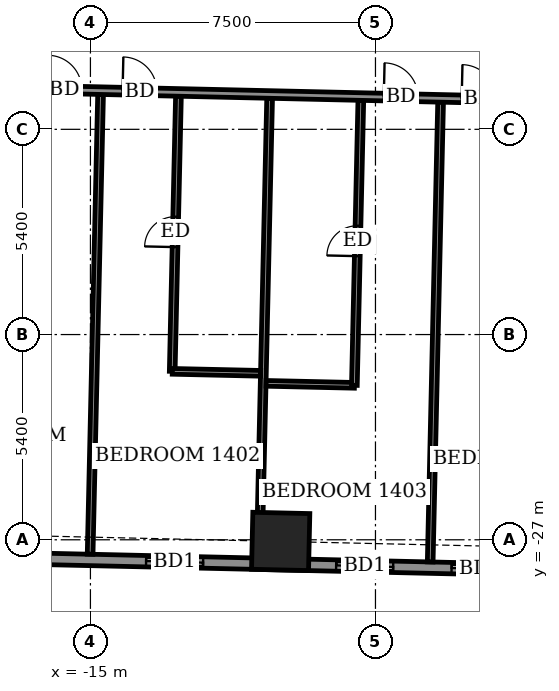
"""IFC4 building model, lengths in metres.
Left out: names, types, materials, properties, quantities, classifications, styles, units other than length and angle.
Written with IfcOpenShell. Run it as: python <this file> out.ifc"""

import sys

from ifc_helpers import new_model, si_unit, direction, frame, frame_2d, origin, origin_2d, place, context, subcontext, project, spatial, rectangle, extrude, element, fill, save


model = new_model("IFC4")
c1 = context("Model", 3, precision=1e-05, world=origin(), true_north=direction((0.0, 1.0)))
c2 = subcontext(c1, "Body", "Model", "MODEL_VIEW")
j1 = project(units=[si_unit("LENGTHUNIT", "METRE"), si_unit("PLANEANGLEUNIT", "RADIAN")], contexts=[c1])
p1 = place(None, origin())
s1 = spatial("IfcSite", under=j1, at=p1, CompositionType="ELEMENT")
p2 = place(p1, origin())
s2 = spatial("IfcBuilding", under=s1, at=p2, CompositionType="ELEMENT")
p3 = place(p2, frame((0.0, 0.0, 60.3)))
s3 = spatial("IfcBuildingStorey", under=s2, at=p3, CompositionType="ELEMENT", Elevation=60.3)
p4 = place(p3, frame((-9.994, -27.043, -0.55), z_axis=(0.0, 0.0, 1.0), x_axis=(0.999742783124, -0.022679673549, 0.0)))
e1 = element("IfcColumn", 1, at=p4, inside=s3, PredefinedType="COLUMN", context=c2, shape_type="SweptSolid", body=[
    extrude(rectangle(XDim=1.5, YDim=1.5, at=origin_2d()), origin(), (0.0, 0.0, 1.0), 3.6),
])
p5 = place(p3, frame((-24.007, -27.326, 0.0), z_axis=(0.0, 0.0, 1.0), x_axis=(0.999742536491, -0.022690542744, 0.0)))
e2 = element("IfcWall", 2, at=p5, inside=s3, PredefinedType="SOLIDWALL", context=c2, shape_type="SweptSolid", body=[
    extrude(rectangle(XDim=49.236, YDim=0.3, at=frame_2d((24.618, 0.0))), origin(), (0.0, 0.0, 1.0), 3.05),
])
p6 = place(p5, frame((2.115, 0.0, 0.0)))
e3 = element("IfcOpeningElement", 3, at=p6, cuts=e2, PredefinedType="OPENING", context=c2, shape_type="SweptSolid", body=[
    extrude(rectangle(XDim=1.5, YDim=2.4, at=frame_2d((0.75, 1.2))), frame((0.0, 0.16, 0.0), z_axis=(0.0, -1.0, 0.0), x_axis=(1.0, 0.0, 0.0)), (0.0, 0.0, 1.0), 0.32),
])
p7 = place(p5, frame((5.088, 0.0, 0.9)))
e4 = element("IfcOpeningElement", 4, at=p7, cuts=e2, PredefinedType="OPENING", context=c2, shape_type="SweptSolid", body=[
    extrude(rectangle(XDim=0.9, YDim=1.5, at=frame_2d((0.45, 0.75))), frame((0.0, 0.16, 0.0), z_axis=(0.0, -1.0, 0.0), x_axis=(1.0, 0.0, 0.0)), (0.0, 0.0, 1.0), 0.32),
])
p8 = place(p5, frame((10.475, 0.0, 0.0)))
e5 = element("IfcOpeningElement", 5, at=p8, cuts=e2, PredefinedType="OPENING", context=c2, shape_type="SweptSolid", body=[
    extrude(rectangle(XDim=1.5, YDim=2.4, at=frame_2d((0.75, 1.2))), frame((0.0, 0.16, 0.0), z_axis=(0.0, -1.0, 0.0), x_axis=(1.0, 0.0, 0.0)), (0.0, 0.0, 1.0), 0.32),
])
p9 = place(p5, frame((15.477, 0.0, 0.0)))
e6 = element("IfcOpeningElement", 6, at=p9, cuts=e2, PredefinedType="OPENING", context=c2, shape_type="SweptSolid", body=[
    extrude(rectangle(XDim=1.5, YDim=2.4, at=frame_2d((0.75, 1.2))), frame((0.0, 0.16, 0.0), z_axis=(0.0, -1.0, 0.0), x_axis=(1.0, 0.0, 0.0)), (0.0, 0.0, 1.0), 0.32),
])
p10 = place(p5, frame((18.515, 0.0, 0.0)))
e7 = element("IfcOpeningElement", 7, at=p10, cuts=e2, PredefinedType="OPENING", context=c2, shape_type="SweptSolid", body=[
    extrude(rectangle(XDim=1.5, YDim=2.4, at=frame_2d((0.75, 1.2))), frame((0.0, 0.16, 0.0), z_axis=(0.0, -1.0, 0.0), x_axis=(1.0, 0.0, 0.0)), (0.0, 0.0, 1.0), 0.32),
])
p11 = place(p5, frame((23.825, 0.0, 0.0)))
e8 = element("IfcOpeningElement", 8, at=p11, cuts=e2, PredefinedType="OPENING", context=c2, shape_type="SweptSolid", body=[
    extrude(rectangle(XDim=1.5, YDim=2.4, at=frame_2d((0.75, 1.2))), frame((0.0, 0.16, 0.0), z_axis=(0.0, -1.0, 0.0), x_axis=(1.0, 0.0, 0.0)), (0.0, 0.0, 1.0), 0.32),
])
p12 = place(p5, frame((29.128, 0.0, 0.0)))
e9 = element("IfcOpeningElement", 9, at=p12, cuts=e2, PredefinedType="OPENING", context=c2, shape_type="SweptSolid", body=[
    extrude(rectangle(XDim=1.5, YDim=2.4, at=frame_2d((0.75, 1.2))), frame((0.0, 0.16, 0.0), z_axis=(0.0, -1.0, 0.0), x_axis=(1.0, 0.0, 0.0)), (0.0, 0.0, 1.0), 0.32),
])
p13 = place(p5, frame((32.166, 0.0, 0.0)))
e10 = element("IfcOpeningElement", 10, at=p13, cuts=e2, PredefinedType="OPENING", context=c2, shape_type="SweptSolid", body=[
    extrude(rectangle(XDim=1.5, YDim=2.4, at=frame_2d((0.75, 1.2))), frame((0.0, 0.16, 0.0), z_axis=(0.0, -1.0, 0.0), x_axis=(1.0, 0.0, 0.0)), (0.0, 0.0, 1.0), 0.32),
])
p14 = place(p5, frame((37.091, 0.0, 0.0)))
e11 = element("IfcOpeningElement", 11, at=p14, cuts=e2, PredefinedType="OPENING", context=c2, shape_type="SweptSolid", body=[
    extrude(rectangle(XDim=1.5, YDim=2.4, at=frame_2d((0.75, 1.2))), frame((0.0, 0.16, 0.0), z_axis=(0.0, -1.0, 0.0), x_axis=(1.0, 0.0, 0.0)), (0.0, 0.0, 1.0), 0.32),
])
p15 = place(p5, frame((40.205, 0.0, 0.0)))
e12 = element("IfcOpeningElement", 12, at=p15, cuts=e2, PredefinedType="OPENING", context=c2, shape_type="SweptSolid", body=[
    extrude(rectangle(XDim=1.2, YDim=2.4, at=frame_2d((0.6, 1.2))), frame((0.0, 0.16, 0.0), z_axis=(0.0, -1.0, 0.0), x_axis=(1.0, 0.0, 0.0)), (0.0, 0.0, 1.0), 0.32),
])
p16 = place(p5, frame((45.047, 0.0, 0.9)))
e13 = element("IfcOpeningElement", 13, at=p16, cuts=e2, PredefinedType="OPENING", context=c2, shape_type="SweptSolid", body=[
    extrude(rectangle(XDim=2.4, YDim=1.5, at=frame_2d((1.2, 0.75))), frame((0.0, 0.16, 0.0), z_axis=(0.0, -1.0, 0.0), x_axis=(1.0, 0.0, 0.0)), (0.0, 0.0, 1.0), 0.32),
])
p17 = place(p3, frame((-15.008, -27.38, 0.0), z_axis=(0.0, 0.0, 1.0), x_axis=(0.02273928012, 0.99974142914, 0.0)))
e14 = element("IfcWall", 14, at=p17, inside=s3, PredefinedType="PARTITIONING", context=c2, shape_type="SweptSolid", body=[
    extrude(rectangle(XDim=12.1, YDim=0.15, at=frame_2d((6.05, 0.0))), origin(), (0.0, 0.0, 1.0), 2.55),
])
p18 = place(p3, frame((-10.559, -27.481, 0.0), z_axis=(0.0, 0.0, 1.0), x_axis=(0.022658614335, 0.999743260641, 0.0)))
e15 = element("IfcWall", 15, at=p18, inside=s3, PredefinedType="PARTITIONING", context=c2, shape_type="SweptSolid", body=[
    extrude(rectangle(XDim=12.1, YDim=0.15, at=frame_2d((6.05, 0.0))), origin(), (0.0, 0.0, 1.0), 3.05),
])
p19 = place(p3, frame((-6.06, -27.583, 0.0), z_axis=(0.0, 0.0, 1.0), x_axis=(0.022658614335, 0.999743260641, 0.0)))
e16 = element("IfcWall", 16, at=p19, inside=s3, PredefinedType="PARTITIONING", context=c2, shape_type="SweptSolid", body=[
    extrude(rectangle(XDim=12.1, YDim=0.15, at=frame_2d((6.05, 0.0))), origin(), (0.0, 0.0, 1.0), 2.55),
])
p20 = place(p3, frame((-10.378, -22.884, 0.0), z_axis=(0.0, 0.0, 1.0), x_axis=(0.999749954681, -0.022361308448, 0.0)))
e17 = element("IfcWall", 17, at=p20, inside=s3, PredefinedType="PARTITIONING", context=c2, shape_type="SweptSolid", body=[
    extrude(rectangle(XDim=2.325, YDim=0.15, at=frame_2d((1.163, 0.0))), origin(), (0.0, 0.0, 1.0), 3.05),
])
p21 = place(p3, frame((-8.055, -22.936, 0.0), z_axis=(0.0, 0.0, 1.0), x_axis=(0.022656334507, 0.999743312309, 0.0)))
e18 = element("IfcWall", 18, at=p21, inside=s3, PredefinedType="PARTITIONING", context=c2, shape_type="SweptSolid", body=[
    extrude(rectangle(XDim=7.5, YDim=0.15, at=frame_2d((3.75, 0.0))), origin(), (0.0, 0.0, 1.0), 3.05),
])
p22 = place(p21, frame((3.4, 0.0, 0.0)))
e19 = element("IfcOpeningElement", 19, at=p22, cuts=e18, PredefinedType="OPENING", context=c2, shape_type="SweptSolid", body=[
    extrude(rectangle(XDim=0.8, YDim=2.1, at=frame_2d((0.4, 1.05))), frame((0.0, 0.085, 0.0), z_axis=(0.0, -1.0, 0.0), x_axis=(1.0, 0.0, 0.0)), (0.0, 0.0, 1.0), 0.17),
])
p23 = place(p3, frame((-12.848, -22.568, 0.0), z_axis=(0.0, 0.0, 1.0), x_axis=(0.022624135841, 0.999744041481, 0.0)))
e20 = element("IfcWall", 20, at=p23, inside=s3, PredefinedType="PARTITIONING", context=c2, shape_type="SweptSolid", body=[
    extrude(rectangle(XDim=7.241, YDim=0.15, at=frame_2d((3.621, 0.0))), origin(), (0.0, 0.0, 1.0), 3.05),
])
p24 = place(p23, frame((3.27, 0.0, 0.0)))
e21 = element("IfcOpeningElement", 21, at=p24, cuts=e20, PredefinedType="OPENING", context=c2, shape_type="SweptSolid", body=[
    extrude(rectangle(XDim=0.8, YDim=2.1, at=frame_2d((0.4, 1.05))), frame((0.0, 0.085, 0.0), z_axis=(0.0, -1.0, 0.0), x_axis=(1.0, 0.0, 0.0)), (0.0, 0.0, 1.0), 0.17),
])
p25 = place(p3, frame((-12.846, -22.568, 0.0), z_axis=(0.0, 0.0, 1.0), x_axis=(0.999749744571, -0.022370700241, 0.0)))
e22 = element("IfcWall", 22, at=p25, inside=s3, PredefinedType="PARTITIONING", context=c2, shape_type="SweptSolid", body=[
    extrude(rectangle(XDim=2.324, YDim=0.15, at=frame_2d((1.162, 0.0))), origin(), (0.0, 0.0, 1.0), 3.05),
])
p26 = place(p3, frame((-26.126, -14.924, 0.0), z_axis=(0.0, 0.0, 1.0), x_axis=(0.999742687583, -0.0226838847, 0.0)))
e23 = element("IfcWall", 23, at=p26, inside=s3, PredefinedType="PARTITIONING", context=c2, shape_type="SweptSolid", body=[
    extrude(rectangle(XDim=54.836, YDim=0.2, at=frame_2d((27.418, 0.0))), origin(), (0.0, 0.0, 1.0), 3.05),
])
p27 = place(p26, frame((0.775, 0.0, 0.0)))
e24 = element("IfcOpeningElement", 24, at=p27, cuts=e23, PredefinedType="OPENING", context=c2, shape_type="SweptSolid", body=[
    extrude(rectangle(XDim=1.0, YDim=2.1, at=frame_2d((0.5, 1.05))), frame((0.0, 0.11, 0.0), z_axis=(0.0, -1.0, 0.0), x_axis=(1.0, 0.0, 0.0)), (0.0, 0.0, 1.0), 0.22),
])
p28 = place(p26, frame((5.45, 0.0, 0.0)))
e25 = element("IfcOpeningElement", 25, at=p28, cuts=e23, PredefinedType="OPENING", context=c2, shape_type="SweptSolid", body=[
    extrude(rectangle(XDim=0.9, YDim=2.1, at=frame_2d((0.45, 1.05))), frame((0.0, 0.11, 0.0), z_axis=(0.0, -1.0, 0.0), x_axis=(1.0, 0.0, 0.0)), (0.0, 0.0, 1.0), 0.22),
])
p29 = place(p26, frame((10.0, 0.0, 0.0)))
e26 = element("IfcOpeningElement", 26, at=p29, cuts=e23, PredefinedType="OPENING", context=c2, shape_type="SweptSolid", body=[
    extrude(rectangle(XDim=0.9, YDim=2.1, at=frame_2d((0.45, 1.05))), frame((0.0, 0.11, 0.0), z_axis=(0.0, -1.0, 0.0), x_axis=(1.0, 0.0, 0.0)), (0.0, 0.0, 1.0), 0.22),
])
p30 = place(p26, frame((11.975, 0.0, 0.0)))
e27 = element("IfcOpeningElement", 27, at=p30, cuts=e23, PredefinedType="OPENING", context=c2, shape_type="SweptSolid", body=[
    extrude(rectangle(XDim=0.9, YDim=2.1, at=frame_2d((0.45, 1.05))), frame((0.0, 0.11, 0.0), z_axis=(0.0, -1.0, 0.0), x_axis=(1.0, 0.0, 0.0)), (0.0, 0.0, 1.0), 0.22),
])
p31 = place(p26, frame((18.85, 0.0, 0.0)))
e28 = element("IfcOpeningElement", 28, at=p31, cuts=e23, PredefinedType="OPENING", context=c2, shape_type="SweptSolid", body=[
    extrude(rectangle(XDim=0.9, YDim=2.1, at=frame_2d((0.45, 1.05))), frame((0.0, 0.11, 0.0), z_axis=(0.0, -1.0, 0.0), x_axis=(1.0, 0.0, 0.0)), (0.0, 0.0, 1.0), 0.22),
])
p32 = place(p26, frame((20.9, 0.0, 0.0)))
e29 = element("IfcOpeningElement", 29, at=p32, cuts=e23, PredefinedType="OPENING", context=c2, shape_type="SweptSolid", body=[
    extrude(rectangle(XDim=0.9, YDim=2.1, at=frame_2d((0.45, 1.05))), frame((0.0, 0.11, 0.0), z_axis=(0.0, -1.0, 0.0), x_axis=(1.0, 0.0, 0.0)), (0.0, 0.0, 1.0), 0.22),
])
p33 = place(p26, frame((27.725, 0.0, 0.0)))
e30 = element("IfcOpeningElement", 30, at=p33, cuts=e23, PredefinedType="OPENING", context=c2, shape_type="SweptSolid", body=[
    extrude(rectangle(XDim=0.9, YDim=2.1, at=frame_2d((0.45, 1.05))), frame((0.0, 0.11, 0.0), z_axis=(0.0, -1.0, 0.0), x_axis=(1.0, 0.0, 0.0)), (0.0, 0.0, 1.0), 0.22),
])
p34 = place(p26, frame((29.7, 0.0, 0.0)))
e31 = element("IfcOpeningElement", 31, at=p34, cuts=e23, PredefinedType="OPENING", context=c2, shape_type="SweptSolid", body=[
    extrude(rectangle(XDim=0.9, YDim=2.1, at=frame_2d((0.45, 1.05))), frame((0.0, 0.11, 0.0), z_axis=(0.0, -1.0, 0.0), x_axis=(1.0, 0.0, 0.0)), (0.0, 0.0, 1.0), 0.22),
])
p35 = place(p26, frame((36.5, 0.0, 0.0)))
e32 = element("IfcOpeningElement", 32, at=p35, cuts=e23, PredefinedType="OPENING", context=c2, shape_type="SweptSolid", body=[
    extrude(rectangle(XDim=0.9, YDim=2.1, at=frame_2d((0.45, 1.05))), frame((0.0, 0.11, 0.0), z_axis=(0.0, -1.0, 0.0), x_axis=(1.0, 0.0, 0.0)), (0.0, 0.0, 1.0), 0.22),
])
p36 = place(p26, frame((38.525, 0.0, 0.0)))
e33 = element("IfcOpeningElement", 33, at=p36, cuts=e23, PredefinedType="OPENING", context=c2, shape_type="SweptSolid", body=[
    extrude(rectangle(XDim=0.9, YDim=2.1, at=frame_2d((0.45, 1.05))), frame((0.0, 0.11, 0.0), z_axis=(0.0, -1.0, 0.0), x_axis=(1.0, 0.0, 0.0)), (0.0, 0.0, 1.0), 0.22),
])
p37 = place(p26, frame((45.325, 0.0, 0.0)))
e34 = element("IfcOpeningElement", 34, at=p37, cuts=e23, PredefinedType="OPENING", context=c2, shape_type="SweptSolid", body=[
    extrude(rectangle(XDim=0.9, YDim=2.1, at=frame_2d((0.45, 1.05))), frame((0.0, 0.11, 0.0), z_axis=(0.0, -1.0, 0.0), x_axis=(1.0, 0.0, 0.0)), (0.0, 0.0, 1.0), 0.22),
])
p38 = place(p26, frame((52.593, 0.0, 0.0)))
e35 = element("IfcOpeningElement", 35, at=p38, cuts=e23, PredefinedType="OPENING", context=c2, shape_type="SweptSolid", body=[
    extrude(rectangle(XDim=1.0, YDim=2.1, at=frame_2d((0.5, 1.05))), frame((0.0, 0.11, 0.0), z_axis=(0.0, -1.0, 0.0), x_axis=(1.0, 0.0, 0.0)), (0.0, 0.0, 1.0), 0.22),
])
p39 = place(p26, frame((47.55, 0.0, 0.0)))
e36 = element("IfcOpeningElement", 36, at=p39, cuts=e23, PredefinedType="OPENING", context=c2, shape_type="SweptSolid", body=[
    extrude(rectangle(XDim=0.9, YDim=2.1, at=frame_2d((0.45, 1.05))), frame((0.0, 0.11, 0.0), z_axis=(0.0, -1.0, 0.0), x_axis=(1.0, 0.0, 0.0)), (0.0, 0.0, 1.0), 0.22),
])
p40 = place(p8, origin())
e37 = element("IfcDoor", 37, at=p40, inside=s3, OperationType="SLIDING_TO_LEFT", PredefinedType="DOOR", context=c2, shape_type="SweptSolid", body=[
    extrude(rectangle(XDim=1.5, YDim=2.4, at=frame_2d((0.75, 1.2))), frame((0.0, 0.025, 0.0), z_axis=(0.0, -1.0, 0.0), x_axis=(1.0, 0.0, 0.0)), (0.0, 0.0, 1.0), 0.05),
])
fill(e5, e37)
p41 = place(p9, origin())
e38 = element("IfcDoor", 38, at=p41, inside=s3, OperationType="SLIDING_TO_LEFT", PredefinedType="DOOR", context=c2, shape_type="SweptSolid", body=[
    extrude(rectangle(XDim=1.5, YDim=2.4, at=frame_2d((0.75, 1.2))), frame((0.0, 0.025, 0.0), z_axis=(0.0, -1.0, 0.0), x_axis=(1.0, 0.0, 0.0)), (0.0, 0.0, 1.0), 0.05),
])
fill(e6, e38)
p42 = place(p10, origin())
e39 = element("IfcDoor", 39, at=p42, inside=s3, OperationType="SLIDING_TO_LEFT", PredefinedType="DOOR", context=c2, shape_type="SweptSolid", body=[
    extrude(rectangle(XDim=1.5, YDim=2.4, at=frame_2d((0.75, 1.2))), frame((0.0, 0.025, 0.0), z_axis=(0.0, -1.0, 0.0), x_axis=(1.0, 0.0, 0.0)), (0.0, 0.0, 1.0), 0.05),
])
fill(e7, e39)
p43 = place(p29, origin())
e40 = element("IfcDoor", 40, at=p43, inside=s3, OperationType="SINGLE_SWING_LEFT", PredefinedType="DOOR", context=c2, shape_type="SweptSolid", body=[
    extrude(rectangle(XDim=0.9, YDim=2.1, at=frame_2d((0.45, 1.05))), frame((0.0, 0.025, 0.0), z_axis=(0.0, -1.0, 0.0), x_axis=(1.0, 0.0, 0.0)), (0.0, 0.0, 1.0), 0.05),
])
fill(e26, e40)
p44 = place(p30, origin())
e41 = element("IfcDoor", 41, at=p44, inside=s3, OperationType="SINGLE_SWING_RIGHT", PredefinedType="DOOR", context=c2, shape_type="SweptSolid", body=[
    extrude(rectangle(XDim=0.9, YDim=2.1, at=frame_2d((0.45, 1.05))), frame((0.0, 0.025, 0.0), z_axis=(0.0, -1.0, 0.0), x_axis=(1.0, 0.0, 0.0)), (0.0, 0.0, 1.0), 0.05),
])
fill(e27, e41)
p45 = place(p24, origin())
e42 = element("IfcDoor", 42, at=p45, inside=s3, OperationType="SINGLE_SWING_RIGHT", PredefinedType="DOOR", context=c2, shape_type="SweptSolid", body=[
    extrude(rectangle(XDim=0.8, YDim=2.1, at=frame_2d((0.4, 1.05))), frame((0.0, 0.025, 0.0), z_axis=(0.0, -1.0, 0.0), x_axis=(1.0, 0.0, 0.0)), (0.0, 0.0, 1.0), 0.05),
])
fill(e21, e42)
p46 = place(p31, origin())
e43 = element("IfcDoor", 43, at=p46, inside=s3, OperationType="SINGLE_SWING_LEFT", PredefinedType="DOOR", context=c2, shape_type="SweptSolid", body=[
    extrude(rectangle(XDim=0.9, YDim=2.1, at=frame_2d((0.45, 1.05))), frame((0.0, 0.025, 0.0), z_axis=(0.0, -1.0, 0.0), x_axis=(1.0, 0.0, 0.0)), (0.0, 0.0, 1.0), 0.05),
])
fill(e28, e43)
p47 = place(p22, origin())
e44 = element("IfcDoor", 44, at=p47, inside=s3, OperationType="SINGLE_SWING_LEFT", PredefinedType="DOOR", context=c2, shape_type="SweptSolid", body=[
    extrude(rectangle(XDim=0.8, YDim=2.1, at=frame_2d((0.4, 1.05))), frame((0.0, 0.025, 0.0), z_axis=(0.0, -1.0, 0.0), x_axis=(1.0, 0.0, 0.0)), (0.0, 0.0, 1.0), 0.05),
])
fill(e19, e44)
p48 = place(p32, origin())
e45 = element("IfcDoor", 45, at=p48, inside=s3, OperationType="SINGLE_SWING_RIGHT", PredefinedType="DOOR", context=c2, shape_type="SweptSolid", body=[
    extrude(rectangle(XDim=0.9, YDim=2.1, at=frame_2d((0.45, 1.05))), frame((0.0, 0.025, 0.0), z_axis=(0.0, -1.0, 0.0), x_axis=(1.0, 0.0, 0.0)), (0.0, 0.0, 1.0), 0.05),
])
fill(e29, e45)
save(model, sys.argv[1])
